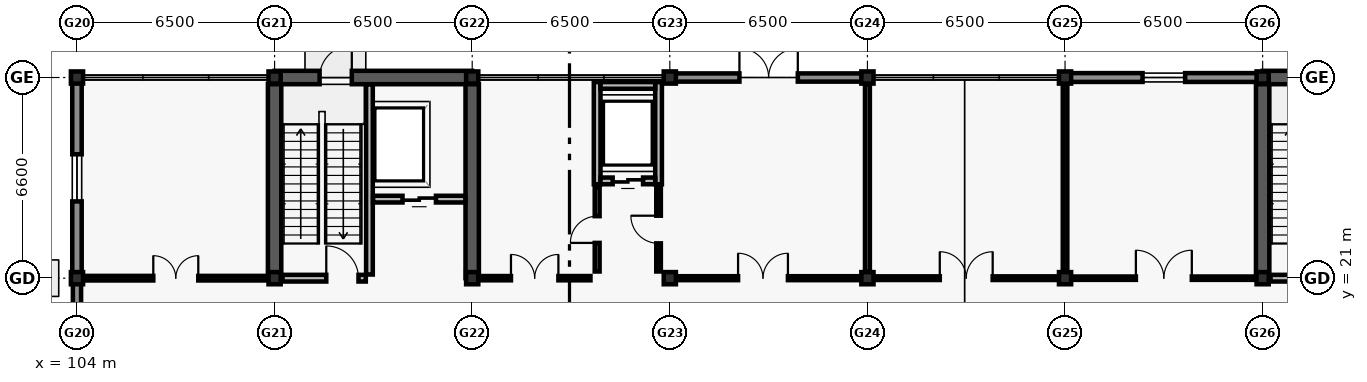
"""IFC4 building model, lengths in metres.
Left out: names, types, materials, properties, quantities, classifications, styles, units other than length and angle.
Written with IfcOpenShell. Run it as: python <this file> out.ifc"""

import sys

from ifc_helpers import new_model, si_unit, direction, frame, frame_2d, origin, origin_2d, place, context, subcontext, project, spatial, rectangle, i_section, extrude, element, fill, save


model = new_model("IFC4")
c1 = context("Model", 3, precision=1e-05, world=origin(), true_north=direction((0.0, 1.0)))
c2 = subcontext(c1, "Body", "Model", "MODEL_VIEW")
j1 = project(units=[si_unit("LENGTHUNIT", "METRE"), si_unit("PLANEANGLEUNIT", "RADIAN")], contexts=[c1])
p1 = place(None, origin())
s1 = spatial("IfcSite", under=j1, at=p1, CompositionType="ELEMENT")
p2 = place(p1, origin())
s2 = spatial("IfcBuilding", under=s1, at=p2, CompositionType="ELEMENT")
p3 = place(p2, origin())
s3 = spatial("IfcBuildingStorey", under=s2, at=p3, CompositionType="ELEMENT", Elevation=0.0)
for number, where, z_axis, x_axis in (
    (1, (104.0, 21.0, 0.0), (0.0, 0.0, 1.0), (1.0, 0.0, 0.0)),
    (2, (104.0, 27.6, 0.0), (0.0, 0.0, 1.0), (1.0, 0.0, 0.0)),
    (3, (110.5, 21.0, 0.0), (0.0, 0.0, 1.0), (1.0, 0.0, 0.0)),
    (4, (110.5, 27.6, 0.0), (0.0, 0.0, 1.0), (1.0, 0.0, 0.0)),
    (5, (117.0, 21.0, 0.0), (0.0, 0.0, 1.0), (1.0, 0.0, 0.0)),
    (6, (117.0, 27.6, 0.0), (0.0, 0.0, 1.0), (1.0, 0.0, 0.0)),
    (7, (123.5, 21.0, 0.0), (0.0, 0.0, 1.0), (1.0, 0.0, 0.0)),
    (8, (123.5, 27.6, 0.0), (0.0, 0.0, 1.0), (1.0, 0.0, 0.0)),
    (9, (130.0, 21.0, 0.0), (0.0, 0.0, 1.0), (1.0, 0.0, 0.0)),
    (10, (130.0, 27.6, 0.0), (0.0, 0.0, 1.0), (1.0, 0.0, 0.0)),
    (11, (136.5, 21.0, 0.0), (0.0, 0.0, 1.0), (1.0, 0.0, 0.0)),
    (12, (136.5, 27.6, 0.0), (0.0, 0.0, 1.0), (1.0, 0.0, 0.0)),
    (13, (143.0, 21.0, 0.0), (0.0, 0.0, 1.0), (1.0, 0.0, 0.0)),
    (14, (143.0, 27.6, 0.0), (0.0, 0.0, 1.0), (1.0, 0.0, 0.0)),
):
    element("IfcColumn", number, at=place(p3, frame(where, z_axis=z_axis, x_axis=x_axis)), inside=s3, PredefinedType="COLUMN", context=c2, shape_type="SweptSolid", body=[
        extrude(i_section(OverallWidth=0.4, OverallDepth=0.4, WebThickness=0.02, FlangeThickness=0.032, at=origin_2d()), origin(), (0.0, 0.0, 1.0), 5.4),
    ])
p4 = place(p3, frame((110.5, 27.6, 0.0), z_axis=(0.0, 0.0, 1.0), x_axis=(1.0, 0.0, 0.0)))
e15 = element("IfcWall", 15, at=p4, inside=s3, PredefinedType="SHEAR", context=c2, shape_type="SweptSolid", body=[
    extrude(rectangle(XDim=6.5, YDim=0.44, at=frame_2d((3.25, 0.0))), origin(), (0.0, 0.0, 1.0), 5.16),
])
p5 = place(p4, frame((1.48, 0.0, 0.0)))
e16 = element("IfcOpeningElement", 16, at=p5, cuts=e15, PredefinedType="OPENING", context=c2, shape_type="SweptSolid", body=[
    extrude(rectangle(XDim=1.06, YDim=2.12, at=frame_2d((0.53, 1.06))), frame((0.0, 0.23, 0.0), z_axis=(0.0, -1.0, 0.0), x_axis=(1.0, 0.0, 0.0)), (0.0, 0.0, 1.0), 0.46),
])
for number, where, z_axis, x_axis in (
    (17, (110.5, 21.0, 0.0), (0.0, 0.0, 1.0), (0.0, 1.0, 0.0)),
    (18, (117.0, 21.0, 0.0), (0.0, 0.0, 1.0), (0.0, 1.0, 0.0)),
):
    element("IfcWall", number, at=place(p3, frame(where, z_axis=z_axis, x_axis=x_axis)), inside=s3, PredefinedType="SHEAR", context=c2, shape_type="SweptSolid", body=[
        extrude(rectangle(XDim=6.38, YDim=0.44, at=frame_2d((3.19, 0.0))), origin(), (0.0, 0.0, 1.0), 5.16),
    ])
p6 = place(p3, frame((143.0, 27.6, 0.0), z_axis=(0.0, 0.0, 1.0), x_axis=(1.0, 0.0, 0.0)))
e19 = element("IfcWall", 19, at=p6, inside=s3, PredefinedType="SHEAR", context=c2, shape_type="SweptSolid", body=[
    extrude(rectangle(XDim=6.5, YDim=0.44, at=frame_2d((3.25, 0.0))), origin(), (0.0, 0.0, 1.0), 5.16),
])
p7 = place(p6, frame((1.48, 0.0, 0.0)))
e20 = element("IfcOpeningElement", 20, at=p7, cuts=e19, PredefinedType="OPENING", context=c2, shape_type="SweptSolid", body=[
    extrude(rectangle(XDim=1.06, YDim=2.12, at=frame_2d((0.53, 1.06))), frame((0.0, 0.23, 0.0), z_axis=(0.0, -1.0, 0.0), x_axis=(1.0, 0.0, 0.0)), (0.0, 0.0, 1.0), 0.46),
])
p8 = place(p3, frame((143.0, 21.0, 0.0), z_axis=(0.0, 0.0, 1.0), x_axis=(0.0, 1.0, 0.0)))
e21 = element("IfcWall", 21, at=p8, inside=s3, PredefinedType="SHEAR", context=c2, shape_type="SweptSolid", body=[
    extrude(rectangle(XDim=6.38, YDim=0.44, at=frame_2d((3.19, 0.0))), origin(), (0.0, 0.0, 1.0), 5.16),
])
p9 = place(p3, frame((123.505, 27.6, 0.0), z_axis=(0.0, 0.0, 1.0), x_axis=(1.0, 0.0, 0.0)))
e22 = element("IfcWall", 22, at=p9, inside=s3, PredefinedType="SOLIDWALL", context=c2, shape_type="SweptSolid", body=[
    extrude(rectangle(XDim=6.49, YDim=0.27, at=frame_2d((3.245, 0.0))), origin(), (0.0, 0.0, 1.0), 4.52),
])
p10 = place(p9, frame((2.285, 0.0, 0.0)))
e23 = element("IfcOpeningElement", 23, at=p10, cuts=e22, PredefinedType="OPENING", context=c2, shape_type="SweptSolid", body=[
    extrude(rectangle(XDim=1.92, YDim=2.25, at=frame_2d((0.96, 1.125))), frame((0.0, 0.145, 0.0), z_axis=(0.0, -1.0, 0.0), x_axis=(1.0, 0.0, 0.0)), (0.0, 0.0, 1.0), 0.29),
])
p11 = place(p3, frame((136.505, 27.6, 0.0), z_axis=(0.0, 0.0, 1.0), x_axis=(1.0, 0.0, 0.0)))
e24 = element("IfcWall", 24, at=p11, inside=s3, PredefinedType="SOLIDWALL", context=c2, shape_type="SweptSolid", body=[
    extrude(rectangle(XDim=6.49, YDim=0.29, at=frame_2d((3.245, 0.0))), origin(), (0.0, 0.0, 1.0), 4.52),
])
p12 = place(p11, frame((2.545, 0.0, 0.8)))
e25 = element("IfcOpeningElement", 25, at=p12, cuts=e24, PredefinedType="OPENING", context=c2, shape_type="SweptSolid", body=[
    extrude(rectangle(XDim=1.4, YDim=1.5, at=frame_2d((0.7, 0.75))), frame((0.0, 0.155, 0.0), z_axis=(0.0, -1.0, 0.0), x_axis=(1.0, 0.0, 0.0)), (0.0, 0.0, 1.0), 0.31),
])
p13 = place(p3, frame((104.0, 14.405, 0.0), z_axis=(0.0, 0.0, 1.0), x_axis=(0.0, 1.0, 0.0)))
e26 = element("IfcWall", 26, at=p13, inside=s3, PredefinedType="SOLIDWALL", context=c2, shape_type="SweptSolid", body=[
    extrude(rectangle(XDim=6.59, YDim=0.27, at=frame_2d((3.295, 0.0))), origin(), (0.0, 0.0, 1.0), 4.52),
])
p14 = place(p13, frame((1.288, 0.0, 0.8)))
e27 = element("IfcOpeningElement", 27, at=p14, cuts=e26, PredefinedType="OPENING", context=c2, shape_type="SweptSolid", body=[
    extrude(rectangle(XDim=1.25, YDim=1.65, at=frame_2d((0.625, 0.825))), frame((0.0, 0.145, 0.0), z_axis=(0.0, -1.0, 0.0), x_axis=(1.0, 0.0, 0.0)), (0.0, 0.0, 1.0), 0.29),
])
p15 = place(p3, frame((104.0, 21.005, 0.0), z_axis=(0.0, 0.0, 1.0), x_axis=(0.0, 1.0, 0.0)))
e28 = element("IfcWall", 28, at=p15, inside=s3, PredefinedType="SOLIDWALL", context=c2, shape_type="SweptSolid", body=[
    extrude(rectangle(XDim=6.59, YDim=0.31, at=frame_2d((3.295, 0.0))), origin(), (0.0, 0.0, 1.0), 4.52),
])
p16 = place(p15, frame((2.52, 0.0, 0.8)))
e29 = element("IfcOpeningElement", 29, at=p16, cuts=e28, PredefinedType="OPENING", context=c2, shape_type="SweptSolid", body=[
    extrude(rectangle(XDim=1.55, YDim=1.65, at=frame_2d((0.775, 0.825))), frame((0.0, 0.165, 0.0), z_axis=(0.0, -1.0, 0.0), x_axis=(1.0, 0.0, 0.0)), (0.0, 0.0, 1.0), 0.33),
])
p17 = place(p3, frame((113.62, 21.12, 0.0), z_axis=(0.0, 0.0, 1.0), x_axis=(0.0, 1.0, 0.0)))
e30 = element("IfcWall", 30, at=p17, inside=s3, PredefinedType="SOLIDWALL", context=c2, shape_type="SweptSolid", body=[
    extrude(rectangle(XDim=6.255, YDim=0.22, at=frame_2d((3.127, 0.0))), origin(), (0.0, 0.0, 1.0), 5.16),
])
p18 = place(p3, frame((110.76, 21.0, 0.0), z_axis=(0.0, 0.0, 1.0), x_axis=(1.0, 0.0, 0.0)))
e31 = element("IfcWall", 31, at=p18, inside=s3, PredefinedType="SOLIDWALL", context=c2, shape_type="SweptSolid", body=[
    extrude(rectangle(XDim=2.74, YDim=0.22, at=frame_2d((1.37, 0.0))), origin(), (0.0, 0.0, 1.0), 4.52),
])
p19 = place(p18, frame((1.44, 0.0, 0.0)))
e32 = element("IfcOpeningElement", 32, at=p19, cuts=e31, PredefinedType="OPENING", context=c2, shape_type="SweptSolid", body=[
    extrude(rectangle(XDim=1.06, YDim=2.1, at=frame_2d((0.53, 1.05))), frame((0.0, 0.12, 0.0), z_axis=(0.0, -1.0, 0.0), x_axis=(1.0, 0.0, 0.0)), (0.0, 0.0, 1.0), 0.24),
])
p20 = place(p3, frame((113.74, 23.6, 0.0), z_axis=(0.0, 0.0, 1.0), x_axis=(1.0, 0.0, 0.0)))
e33 = element("IfcWall", 33, at=p20, inside=s3, PredefinedType="SOLIDWALL", context=c2, shape_type="SweptSolid", body=[
    extrude(rectangle(XDim=3.035, YDim=0.22, at=frame_2d((1.518, 0.0))), origin(), (0.0, 0.0, 1.0), 5.16),
])
p21 = place(p20, frame((0.968, 0.0, 0.0)))
e34 = element("IfcOpeningElement", 34, at=p21, cuts=e33, PredefinedType="OPENING", context=c2, shape_type="SweptSolid", body=[
    extrude(rectangle(XDim=1.1, YDim=2.1, at=frame_2d((0.55, 1.05))), frame((0.0, 0.12, 0.0), z_axis=(0.0, -1.0, 0.0), x_axis=(1.0, 0.0, 0.0)), (0.0, 0.0, 1.0), 0.24),
])
for number, where, z_axis, x_axis in (
    (35, (121.11, 24.09, 0.0), (0.0, 0.0, 1.0), (0.0, 1.0, 0.0)),
    (36, (123.13, 24.09, 0.0), (0.0, 0.0, 1.0), (0.0, 1.0, 0.0)),
):
    element("IfcWall", number, at=place(p3, frame(where, z_axis=z_axis, x_axis=x_axis)), inside=s3, PredefinedType="SOLIDWALL", context=c2, shape_type="SweptSolid", body=[
        extrude(rectangle(XDim=3.36, YDim=0.22, at=frame_2d((1.68, 0.0))), origin(), (0.0, 0.0, 1.0), 5.16),
    ])
p22 = place(p3, frame((121.22, 27.34, 0.0), z_axis=(0.0, 0.0, 1.0), x_axis=(1.0, 0.0, 0.0)))
e37 = element("IfcWall", 37, at=p22, inside=s3, PredefinedType="SOLIDWALL", context=c2, shape_type="SweptSolid", body=[
    extrude(rectangle(XDim=1.8, YDim=0.22, at=frame_2d((0.9, 0.0))), origin(), (0.0, 0.0, 1.0), 5.16),
])
p23 = place(p3, frame((121.22, 24.2, 0.0), z_axis=(0.0, 0.0, 1.0), x_axis=(1.0, 0.0, 0.0)))
e38 = element("IfcWall", 38, at=p23, inside=s3, PredefinedType="SOLIDWALL", context=c2, shape_type="SweptSolid", body=[
    extrude(rectangle(XDim=1.8, YDim=0.22, at=frame_2d((0.9, 0.0))), origin(), (0.0, 0.0, 1.0), 5.16),
])
p24 = place(p23, frame((0.4, 0.0, 0.0)))
e39 = element("IfcOpeningElement", 39, at=p24, cuts=e38, PredefinedType="OPENING", context=c2, shape_type="SweptSolid", body=[
    extrude(rectangle(XDim=1.0, YDim=2.1, at=frame_2d((0.5, 1.05))), frame((0.0, 0.12, 0.0), z_axis=(0.0, -1.0, 0.0), x_axis=(1.0, 0.0, 0.0)), (0.0, 0.0, 1.0), 0.24),
])
p25 = place(p3, frame((143.26, 21.0, 0.0), z_axis=(0.0, 0.0, 1.0), x_axis=(1.0, 0.0, 0.0)))
e40 = element("IfcWall", 40, at=p25, inside=s3, PredefinedType="SOLIDWALL", context=c2, shape_type="SweptSolid", body=[
    extrude(rectangle(XDim=2.74, YDim=0.22, at=frame_2d((1.37, 0.0))), origin(), (0.0, 0.0, 1.0), 4.52),
])
p26 = place(p25, frame((1.44, 0.0, 0.0)))
e41 = element("IfcOpeningElement", 41, at=p26, cuts=e40, PredefinedType="OPENING", context=c2, shape_type="SweptSolid", body=[
    extrude(rectangle(XDim=1.06, YDim=2.1, at=frame_2d((0.53, 1.05))), frame((0.0, 0.12, 0.0), z_axis=(0.0, -1.0, 0.0), x_axis=(1.0, 0.0, 0.0)), (0.0, 0.0, 1.0), 0.24),
])
p27 = place(p3, frame((121.11, 21.22, 0.0), z_axis=(0.0, 0.0, 1.0), x_axis=(0.0, 1.0, 0.0)))
e42 = element("IfcWall", 42, at=p27, inside=s3, PredefinedType="PARTITIONING", context=c2, shape_type="SweptSolid", body=[
    extrude(rectangle(XDim=2.76, YDim=0.16, at=frame_2d((1.38, 0.0))), origin(), (0.0, 0.0, 1.0), 4.5),
])
p28 = place(p27, frame((0.94, 0.0, 0.0)))
e43 = element("IfcOpeningElement", 43, at=p28, cuts=e42, PredefinedType="OPENING", context=c2, shape_type="SweptSolid", body=[
    extrude(rectangle(XDim=0.88, YDim=2.04, at=frame_2d((0.44, 1.02))), frame((0.0, 0.09, 0.0), z_axis=(0.0, -1.0, 0.0), x_axis=(1.0, 0.0, 0.0)), (0.0, 0.0, 1.0), 0.18),
])
p29 = place(p3, frame((123.13, 21.22, 0.0), z_axis=(0.0, 0.0, 1.0), x_axis=(0.0, 1.0, 0.0)))
e44 = element("IfcWall", 44, at=p29, inside=s3, PredefinedType="PARTITIONING", context=c2, shape_type="SweptSolid", body=[
    extrude(rectangle(XDim=2.76, YDim=0.15, at=frame_2d((1.38, 0.0))), origin(), (0.0, 0.0, 1.0), 4.5),
])
p30 = place(p29, frame((0.925, 0.0, 0.0)))
e45 = element("IfcOpeningElement", 45, at=p30, cuts=e44, PredefinedType="OPENING", context=c2, shape_type="SweptSolid", body=[
    extrude(rectangle(XDim=0.91, YDim=2.06, at=frame_2d((0.455, 1.03))), frame((0.0, 0.085, 0.0), z_axis=(0.0, -1.0, 0.0), x_axis=(1.0, 0.0, 0.0)), (0.0, 0.0, 1.0), 0.17),
])
p31 = place(p3, frame((104.22, 21.0, 0.0), z_axis=(0.0, 0.0, 1.0), x_axis=(1.0, 0.0, 0.0)))
e46 = element("IfcWall", 46, at=p31, inside=s3, PredefinedType="PARTITIONING", context=c2, shape_type="SweptSolid", body=[
    extrude(rectangle(XDim=6.06, YDim=0.15, at=frame_2d((3.03, 0.0))), origin(), (0.0, 0.0, 1.0), 4.5),
])
p32 = place(p31, frame((2.29, 0.0, 0.0)))
e47 = element("IfcOpeningElement", 47, at=p32, cuts=e46, PredefinedType="OPENING", context=c2, shape_type="SweptSolid", body=[
    extrude(rectangle(XDim=1.48, YDim=2.18, at=frame_2d((0.74, 1.09))), frame((0.0, 0.085, 0.0), z_axis=(0.0, -1.0, 0.0), x_axis=(1.0, 0.0, 0.0)), (0.0, 0.0, 1.0), 0.17),
])
p33 = place(p3, frame((117.22, 21.0, 0.0), z_axis=(0.0, 0.0, 1.0), x_axis=(1.0, 0.0, 0.0)))
e48 = element("IfcWall", 48, at=p33, inside=s3, PredefinedType="PARTITIONING", context=c2, shape_type="SweptSolid", body=[
    extrude(rectangle(XDim=3.67, YDim=0.14, at=frame_2d((1.835, 0.0))), origin(), (0.0, 0.0, 1.0), 4.5),
])
p34 = place(p33, frame((1.055, 0.0, 0.0)))
e49 = element("IfcOpeningElement", 49, at=p34, cuts=e48, PredefinedType="OPENING", context=c2, shape_type="SweptSolid", body=[
    extrude(rectangle(XDim=1.56, YDim=2.18, at=frame_2d((0.78, 1.09))), frame((0.0, 0.08, 0.0), z_axis=(0.0, -1.0, 0.0), x_axis=(1.0, 0.0, 0.0)), (0.0, 0.0, 1.0), 0.16),
])
p35 = place(p3, frame((123.35, 21.0, 0.0), z_axis=(0.0, 0.0, 1.0), x_axis=(1.0, 0.0, 0.0)))
e50 = element("IfcWall", 50, at=p35, inside=s3, PredefinedType="PARTITIONING", context=c2, shape_type="SweptSolid", body=[
    extrude(rectangle(XDim=6.43, YDim=0.13, at=frame_2d((3.215, 0.0))), origin(), (0.0, 0.0, 1.0), 4.5),
])
p36 = place(p35, frame((2.395, 0.0, 0.0)))
e51 = element("IfcOpeningElement", 51, at=p36, cuts=e50, PredefinedType="OPENING", context=c2, shape_type="SweptSolid", body=[
    extrude(rectangle(XDim=1.64, YDim=2.2, at=frame_2d((0.82, 1.1))), frame((0.0, 0.075, 0.0), z_axis=(0.0, -1.0, 0.0), x_axis=(1.0, 0.0, 0.0)), (0.0, 0.0, 1.0), 0.15),
])
p37 = place(p3, frame((130.22, 21.0, 0.0), z_axis=(0.0, 0.0, 1.0), x_axis=(1.0, 0.0, 0.0)))
e52 = element("IfcWall", 52, at=p37, inside=s3, PredefinedType="PARTITIONING", context=c2, shape_type="SweptSolid", body=[
    extrude(rectangle(XDim=6.06, YDim=0.12, at=frame_2d((3.03, 0.0))), origin(), (0.0, 0.0, 1.0), 4.5),
])
p38 = place(p37, frame((2.16, 0.0, 0.0)))
e53 = element("IfcOpeningElement", 53, at=p38, cuts=e52, PredefinedType="OPENING", context=c2, shape_type="SweptSolid", body=[
    extrude(rectangle(XDim=1.74, YDim=2.2, at=frame_2d((0.87, 1.1))), frame((0.0, 0.07, 0.0), z_axis=(0.0, -1.0, 0.0), x_axis=(1.0, 0.0, 0.0)), (0.0, 0.0, 1.0), 0.14),
])
p39 = place(p3, frame((136.72, 21.0, 0.0), z_axis=(0.0, 0.0, 1.0), x_axis=(1.0, 0.0, 0.0)))
e54 = element("IfcWall", 54, at=p39, inside=s3, PredefinedType="PARTITIONING", context=c2, shape_type="SweptSolid", body=[
    extrude(rectangle(XDim=6.06, YDim=0.11, at=frame_2d((3.03, 0.0))), origin(), (0.0, 0.0, 1.0), 4.5),
])
p40 = place(p39, frame((2.11, 0.0, 0.0)))
e55 = element("IfcOpeningElement", 55, at=p40, cuts=e54, PredefinedType="OPENING", context=c2, shape_type="SweptSolid", body=[
    extrude(rectangle(XDim=1.84, YDim=2.22, at=frame_2d((0.92, 1.11))), frame((0.0, 0.065, 0.0), z_axis=(0.0, -1.0, 0.0), x_axis=(1.0, 0.0, 0.0)), (0.0, 0.0, 1.0), 0.13),
])
p41 = place(p3, frame((130.0, 21.22, 0.0), z_axis=(0.0, 0.0, 1.0), x_axis=(0.0, 1.0, 0.0)))
e56 = element("IfcWall", 56, at=p41, inside=s3, PredefinedType="PARTITIONING", context=c2, shape_type="SweptSolid", body=[
    extrude(rectangle(XDim=6.16, YDim=0.16, at=frame_2d((3.08, 0.0))), origin(), (0.0, 0.0, 1.0), 4.5),
])
p42 = place(p3, frame((136.5, 21.22, 0.0), z_axis=(0.0, 0.0, 1.0), x_axis=(0.0, 1.0, 0.0)))
e57 = element("IfcWall", 57, at=p42, inside=s3, PredefinedType="PARTITIONING", context=c2, shape_type="SweptSolid", body=[
    extrude(rectangle(XDim=6.16, YDim=0.15, at=frame_2d((3.08, 0.0))), origin(), (0.0, 0.0, 1.0), 4.5),
])
p43 = place(p10, origin())
e58 = element("IfcDoor", 58, at=p43, inside=s3, OperationType="DOUBLE_DOOR_SINGLE_SWING", PredefinedType="DOOR", context=c2, shape_type="SweptSolid", body=[
    extrude(rectangle(XDim=1.92, YDim=2.25, at=frame_2d((0.96, 1.125))), frame((0.0, 0.025, 0.0), z_axis=(0.0, -1.0, 0.0), x_axis=(1.0, 0.0, 0.0)), (0.0, 0.0, 1.0), 0.05),
])
fill(e23, e58)
p44 = place(p12, origin())
e59 = element("IfcWindow", 59, at=p44, inside=s3, PartitioningType="SINGLE_PANEL", PredefinedType="WINDOW", context=c2, shape_type="SweptSolid", body=[
    extrude(rectangle(XDim=1.4, YDim=1.5, at=frame_2d((0.7, 0.75))), frame((0.0, 0.03, 0.0), z_axis=(0.0, -1.0, 0.0), x_axis=(1.0, 0.0, 0.0)), (0.0, 0.0, 1.0), 0.06),
])
fill(e25, e59)
p45 = place(p16, origin())
e60 = element("IfcWindow", 60, at=p45, inside=s3, PartitioningType="SINGLE_PANEL", PredefinedType="WINDOW", context=c2, shape_type="SweptSolid", body=[
    extrude(rectangle(XDim=1.55, YDim=1.65, at=frame_2d((0.775, 0.825))), frame((0.0, 0.03, 0.0), z_axis=(0.0, -1.0, 0.0), x_axis=(1.0, 0.0, 0.0)), (0.0, 0.0, 1.0), 0.06),
])
fill(e29, e60)
p46 = place(p19, origin())
e61 = element("IfcDoor", 61, at=p46, inside=s3, OperationType="SINGLE_SWING_LEFT", PredefinedType="DOOR", context=c2, shape_type="SweptSolid", body=[
    extrude(rectangle(XDim=1.06, YDim=2.1, at=frame_2d((0.53, 1.05))), frame((0.0, 0.025, 0.0), z_axis=(0.0, -1.0, 0.0), x_axis=(1.0, 0.0, 0.0)), (0.0, 0.0, 1.0), 0.05),
])
fill(e32, e61)
p47 = place(p5, origin())
e62 = element("IfcDoor", 62, at=p47, inside=s3, OperationType="SINGLE_SWING_RIGHT", PredefinedType="DOOR", context=c2, shape_type="SweptSolid", body=[
    extrude(rectangle(XDim=1.06, YDim=2.12, at=frame_2d((0.53, 1.06))), frame((0.0, 0.025, 0.0), z_axis=(0.0, -1.0, 0.0), x_axis=(1.0, 0.0, 0.0)), (0.0, 0.0, 1.0), 0.05),
])
fill(e16, e62)
p48 = place(p21, origin())
e63 = element("IfcDoor", 63, at=p48, inside=s3, OperationType="DOUBLE_DOOR_SLIDING", PredefinedType="DOOR", context=c2, shape_type="SweptSolid", body=[
    extrude(rectangle(XDim=1.1, YDim=2.1, at=frame_2d((0.55, 1.05))), frame((0.0, 0.025, 0.0), z_axis=(0.0, -1.0, 0.0), x_axis=(1.0, 0.0, 0.0)), (0.0, 0.0, 1.0), 0.05),
])
fill(e34, e63)
p49 = place(p24, origin())
e64 = element("IfcDoor", 64, at=p49, inside=s3, OperationType="DOUBLE_DOOR_SLIDING", PredefinedType="DOOR", context=c2, shape_type="SweptSolid", body=[
    extrude(rectangle(XDim=1.0, YDim=2.1, at=frame_2d((0.5, 1.05))), frame((0.0, 0.025, 0.0), z_axis=(0.0, -1.0, 0.0), x_axis=(1.0, 0.0, 0.0)), (0.0, 0.0, 1.0), 0.05),
])
fill(e39, e64)
p50 = place(p28, origin())
e65 = element("IfcDoor", 65, at=p50, inside=s3, OperationType="SINGLE_SWING_LEFT", PredefinedType="DOOR", context=c2, shape_type="SweptSolid", body=[
    extrude(rectangle(XDim=0.88, YDim=2.04, at=frame_2d((0.44, 1.02))), frame((0.0, 0.025, 0.0), z_axis=(0.0, -1.0, 0.0), x_axis=(1.0, 0.0, 0.0)), (0.0, 0.0, 1.0), 0.05),
])
fill(e43, e65)
p51 = place(p30, origin())
e66 = element("IfcDoor", 66, at=p51, inside=s3, OperationType="SINGLE_SWING_RIGHT", PredefinedType="DOOR", context=c2, shape_type="SweptSolid", body=[
    extrude(rectangle(XDim=0.91, YDim=2.06, at=frame_2d((0.455, 1.03))), frame((0.0, 0.025, 0.0), z_axis=(0.0, -1.0, 0.0), x_axis=(1.0, 0.0, 0.0)), (0.0, 0.0, 1.0), 0.05),
])
fill(e45, e66)
p52 = place(p32, origin())
e67 = element("IfcDoor", 67, at=p52, inside=s3, OperationType="DOUBLE_DOOR_SINGLE_SWING", PredefinedType="DOOR", context=c2, shape_type="SweptSolid", body=[
    extrude(rectangle(XDim=1.48, YDim=2.18, at=frame_2d((0.74, 1.09))), frame((0.0, 0.025, 0.0), z_axis=(0.0, -1.0, 0.0), x_axis=(1.0, 0.0, 0.0)), (0.0, 0.0, 1.0), 0.05),
])
fill(e47, e67)
p53 = place(p34, origin())
e68 = element("IfcDoor", 68, at=p53, inside=s3, OperationType="DOUBLE_DOOR_SINGLE_SWING", PredefinedType="DOOR", context=c2, shape_type="SweptSolid", body=[
    extrude(rectangle(XDim=1.56, YDim=2.18, at=frame_2d((0.78, 1.09))), frame((0.0, 0.025, 0.0), z_axis=(0.0, -1.0, 0.0), x_axis=(1.0, 0.0, 0.0)), (0.0, 0.0, 1.0), 0.05),
])
fill(e49, e68)
p54 = place(p36, origin())
e69 = element("IfcDoor", 69, at=p54, inside=s3, OperationType="DOUBLE_DOOR_SINGLE_SWING", PredefinedType="DOOR", context=c2, shape_type="SweptSolid", body=[
    extrude(rectangle(XDim=1.64, YDim=2.2, at=frame_2d((0.82, 1.1))), frame((0.0, 0.025, 0.0), z_axis=(0.0, -1.0, 0.0), x_axis=(1.0, 0.0, 0.0)), (0.0, 0.0, 1.0), 0.05),
])
fill(e51, e69)
p55 = place(p38, origin())
e70 = element("IfcDoor", 70, at=p55, inside=s3, OperationType="DOUBLE_DOOR_SINGLE_SWING", PredefinedType="DOOR", context=c2, shape_type="SweptSolid", body=[
    extrude(rectangle(XDim=1.74, YDim=2.2, at=frame_2d((0.87, 1.1))), frame((0.0, 0.025, 0.0), z_axis=(0.0, -1.0, 0.0), x_axis=(1.0, 0.0, 0.0)), (0.0, 0.0, 1.0), 0.05),
])
fill(e53, e70)
p56 = place(p40, origin())
e71 = element("IfcDoor", 71, at=p56, inside=s3, OperationType="DOUBLE_DOOR_SINGLE_SWING", PredefinedType="DOOR", context=c2, shape_type="SweptSolid", body=[
    extrude(rectangle(XDim=1.84, YDim=2.22, at=frame_2d((0.92, 1.11))), frame((0.0, 0.025, 0.0), z_axis=(0.0, -1.0, 0.0), x_axis=(1.0, 0.0, 0.0)), (0.0, 0.0, 1.0), 0.05),
])
fill(e55, e71)
save(model, sys.argv[1])
